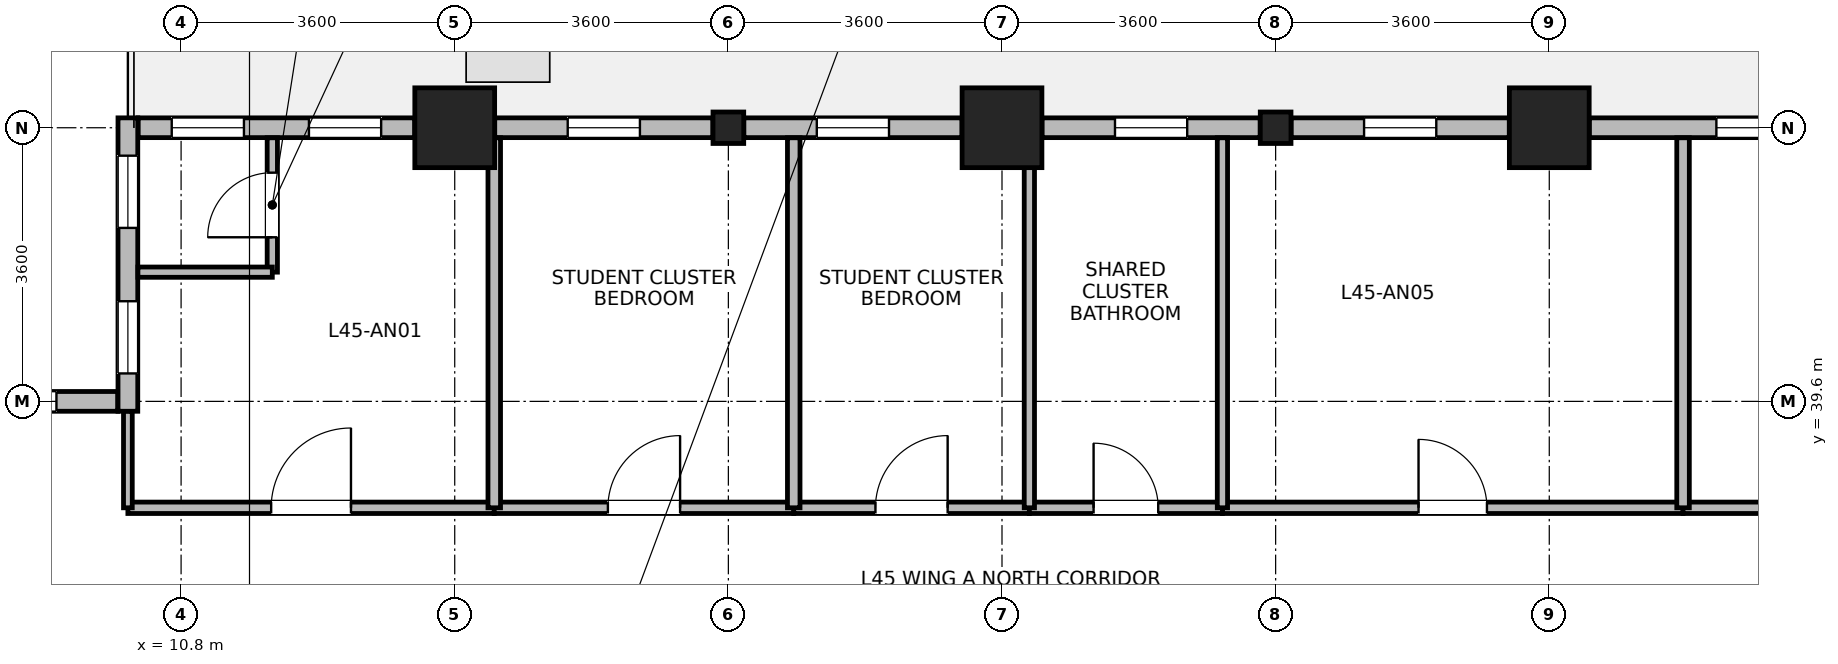
"""IFC4 building model, lengths in metres.
Left out: names, types, materials, properties, quantities, classifications, styles, units other than length and angle.
Written with IfcOpenShell. Run it as: python <this file> out.ifc"""

import sys

from ifc_helpers import new_model, si_unit, direction, frame, frame_2d, origin, origin_2d, place, context, subcontext, project, spatial, rectangle, i_section, extrude, source, transform, mapped, element, fill, save


model = new_model("IFC4")
c1 = context("Model", 3, precision=1e-05, world=origin(), true_north=direction((0.0, 1.0)))
c2 = subcontext(c1, "Body", "Model", "MODEL_VIEW")
j1 = project(units=[si_unit("LENGTHUNIT", "METRE"), si_unit("PLANEANGLEUNIT", "RADIAN")], contexts=[c1])
p1 = place(None, origin())
s1 = spatial("IfcSite", under=j1, at=p1, CompositionType="ELEMENT")
p2 = place(p1, origin())
s2 = spatial("IfcBuilding", under=s1, at=p2, CompositionType="ELEMENT")
p3 = place(p2, frame((0.0, 0.0, 177.2)))
s3 = spatial("IfcBuildingStorey", under=s2, at=p3, CompositionType="ELEMENT", Elevation=177.2)
m1 = source(origin(), c2, "Body", "SweptSolid", [
    extrude(rectangle(XDim=1.05, YDim=1.05, at=origin_2d()), origin(), (0.0, 0.0, 1.0), 3.7),
])
for number, where, z_axis, x_axis in (
    (1, (14.4, 43.2, 0.0), (0.0, 0.0, 1.0), (1.0, 0.0, 0.0)),
    (2, (21.6, 43.2, 0.0), (0.0, 0.0, 1.0), (1.0, 0.0, 0.0)),
    (3, (28.8, 43.2, 0.0), (0.0, 0.0, 1.0), (1.0, 0.0, 0.0)),
):
    element("IfcColumn", number, at=place(p3, frame(where, z_axis=z_axis, x_axis=x_axis)), inside=s3, PredefinedType="COLUMN", context=c2, shape_type="MappedRepresentation", body=[
        mapped(m1, transform((0.0, 0.0, 0.0), x_axis=(1.0, 0.0, 0.0), y_axis=(0.0, 1.0, 0.0), z_axis=(0.0, 0.0, 1.0), scale=1.0)),
    ])
m2 = source(origin(), c2, "Body", "SweptSolid", [
    extrude(i_section(OverallWidth=0.404, OverallDepth=0.414, WebThickness=0.021, FlangeThickness=0.028, FilletRadius=0.015, at=origin_2d()), origin(), (0.0, 0.0, 1.0), 3.7),
])
for number, where, z_axis, x_axis in (
    (4, (18.0, 43.2, 0.0), (0.0, 0.0, 1.0), (1.0, 0.0, 0.0)),
    (5, (25.2, 43.2, 0.0), (0.0, 0.0, 1.0), (1.0, 0.0, 0.0)),
):
    element("IfcColumn", number, at=place(p3, frame(where, z_axis=z_axis, x_axis=x_axis)), inside=s3, PredefinedType="COLUMN", context=c2, shape_type="MappedRepresentation", body=[
        mapped(m2, transform((0.0, 0.0, 0.0), x_axis=(1.0, 0.0, 0.0), y_axis=(0.0, 1.0, 0.0), z_axis=(0.0, 0.0, 1.0), scale=1.0)),
    ])
p4 = place(p3, frame((29.326, 43.2, 0.0), z_axis=(0.0, 0.0, 1.0), x_axis=(1.0, 0.0, 0.0)))
e6 = element("IfcWall", 6, at=p4, inside=s3, PredefinedType="STANDARD", context=c2, shape_type="SweptSolid", body=[
    extrude(rectangle(XDim=2.871, YDim=0.26, at=frame_2d((1.436, 0.0))), origin(), (0.0, 0.0, 1.0), 2.99),
])
p5 = place(p4, frame((1.673, 0.0, 0.85)))
e7 = element("IfcOpeningElement", 7, at=p5, cuts=e6, PredefinedType="OPENING", context=c2, shape_type="SweptSolid", body=[
    extrude(rectangle(XDim=0.95, YDim=1.75, at=frame_2d((0.475, 0.875))), frame((0.0, 0.14, 0.0), z_axis=(0.0, -1.0, 0.0), x_axis=(1.0, 0.0, 0.0)), (0.0, 0.0, 1.0), 0.28),
])
p6 = place(p3, frame((25.403, 43.2, 0.0), z_axis=(0.0, 0.0, 1.0), x_axis=(1.0, 0.0, 0.0)))
e8 = element("IfcWall", 8, at=p6, inside=s3, PredefinedType="STANDARD", context=c2, shape_type="SweptSolid", body=[
    extrude(rectangle(XDim=2.871, YDim=0.26, at=frame_2d((1.436, 0.0))), origin(), (0.0, 0.0, 1.0), 2.99),
])
p7 = place(p6, frame((0.96, 0.0, 0.85)))
e9 = element("IfcOpeningElement", 9, at=p7, cuts=e8, PredefinedType="OPENING", context=c2, shape_type="SweptSolid", body=[
    extrude(rectangle(XDim=0.95, YDim=1.75, at=frame_2d((0.475, 0.875))), frame((0.0, 0.14, 0.0), z_axis=(0.0, -1.0, 0.0), x_axis=(1.0, 0.0, 0.0)), (0.0, 0.0, 1.0), 0.28),
])
p8 = place(p3, frame((22.126, 43.2, 0.0), z_axis=(0.0, 0.0, 1.0), x_axis=(1.0, 0.0, 0.0)))
e10 = element("IfcWall", 10, at=p8, inside=s3, PredefinedType="STANDARD", context=c2, shape_type="SweptSolid", body=[
    extrude(rectangle(XDim=2.871, YDim=0.26, at=frame_2d((1.436, 0.0))), origin(), (0.0, 0.0, 1.0), 2.99),
])
p9 = place(p8, frame((0.96, 0.0, 0.85)))
e11 = element("IfcOpeningElement", 11, at=p9, cuts=e10, PredefinedType="OPENING", context=c2, shape_type="SweptSolid", body=[
    extrude(rectangle(XDim=0.95, YDim=1.75, at=frame_2d((0.475, 0.875))), frame((0.0, 0.14, 0.0), z_axis=(0.0, -1.0, 0.0), x_axis=(1.0, 0.0, 0.0)), (0.0, 0.0, 1.0), 0.28),
])
p10 = place(p3, frame((18.203, 43.2, 0.0), z_axis=(0.0, 0.0, 1.0), x_axis=(1.0, 0.0, 0.0)))
e12 = element("IfcWall", 12, at=p10, inside=s3, PredefinedType="STANDARD", context=c2, shape_type="SweptSolid", body=[
    extrude(rectangle(XDim=2.871, YDim=0.26, at=frame_2d((1.436, 0.0))), origin(), (0.0, 0.0, 1.0), 2.99),
])
p11 = place(p10, frame((0.96, 0.0, 0.85)))
e13 = element("IfcOpeningElement", 13, at=p11, cuts=e12, PredefinedType="OPENING", context=c2, shape_type="SweptSolid", body=[
    extrude(rectangle(XDim=0.95, YDim=1.75, at=frame_2d((0.475, 0.875))), frame((0.0, 0.14, 0.0), z_axis=(0.0, -1.0, 0.0), x_axis=(1.0, 0.0, 0.0)), (0.0, 0.0, 1.0), 0.28),
])
p12 = place(p3, frame((14.926, 43.2, 0.0), z_axis=(0.0, 0.0, 1.0), x_axis=(1.0, 0.0, 0.0)))
e14 = element("IfcWall", 14, at=p12, inside=s3, PredefinedType="STANDARD", context=c2, shape_type="SweptSolid", body=[
    extrude(rectangle(XDim=2.871, YDim=0.26, at=frame_2d((1.436, 0.0))), origin(), (0.0, 0.0, 1.0), 2.99),
])
p13 = place(p12, frame((0.96, 0.0, 0.85)))
e15 = element("IfcOpeningElement", 15, at=p13, cuts=e14, PredefinedType="OPENING", context=c2, shape_type="SweptSolid", body=[
    extrude(rectangle(XDim=0.95, YDim=1.75, at=frame_2d((0.475, 0.875))), frame((0.0, 0.14, 0.0), z_axis=(0.0, -1.0, 0.0), x_axis=(1.0, 0.0, 0.0)), (0.0, 0.0, 1.0), 0.28),
])
p14 = place(p3, frame((10.235, 43.2, 0.0), z_axis=(0.0, 0.0, 1.0), x_axis=(1.0, 0.0, 0.0)))
e16 = element("IfcWall", 16, at=p14, inside=s3, PredefinedType="STANDARD", context=c2, shape_type="SweptSolid", body=[
    extrude(rectangle(XDim=3.639, YDim=0.26, at=frame_2d((1.819, 0.0))), origin(), (0.0, 0.0, 1.0), 3.44),
])
p15 = place(p14, frame((0.442, 0.0, 0.85)))
e17 = element("IfcOpeningElement", 17, at=p15, cuts=e16, PredefinedType="OPENING", context=c2, shape_type="SweptSolid", body=[
    extrude(rectangle(XDim=0.95, YDim=1.75, at=frame_2d((0.475, 0.875))), frame((0.0, 0.14, 0.0), z_axis=(0.0, -1.0, 0.0), x_axis=(1.0, 0.0, 0.0)), (0.0, 0.0, 1.0), 0.28),
])
p16 = place(p14, frame((2.247, 0.0, 0.85)))
e18 = element("IfcOpeningElement", 18, at=p16, cuts=e16, PredefinedType="OPENING", context=c2, shape_type="SweptSolid", body=[
    extrude(rectangle(XDim=0.95, YDim=1.75, at=frame_2d((0.475, 0.875))), frame((0.0, 0.14, 0.0), z_axis=(0.0, -1.0, 0.0), x_axis=(1.0, 0.0, 0.0)), (0.0, 0.0, 1.0), 0.28),
])
p17 = place(p3, frame((10.1, 39.47, 0.0), z_axis=(0.0, 0.0, 1.0), x_axis=(0.0, 1.0, 0.0)))
e19 = element("IfcWall", 19, at=p17, inside=s3, PredefinedType="STANDARD", context=c2, shape_type="SweptSolid", body=[
    extrude(rectangle(XDim=3.86, YDim=0.26, at=frame_2d((1.93, 0.0))), origin(), (0.0, 0.0, 1.0), 3.44),
])
p18 = place(p17, frame((0.498, 0.0, 0.85)))
e20 = element("IfcOpeningElement", 20, at=p18, cuts=e19, PredefinedType="OPENING", context=c2, shape_type="SweptSolid", body=[
    extrude(rectangle(XDim=0.95, YDim=1.75, at=frame_2d((0.475, 0.875))), frame((0.0, 0.14, 0.0), z_axis=(0.0, -1.0, 0.0), x_axis=(1.0, 0.0, 0.0)), (0.0, 0.0, 1.0), 0.28),
])
p19 = place(p17, frame((2.412, 0.0, 0.85)))
e21 = element("IfcOpeningElement", 21, at=p19, cuts=e19, PredefinedType="OPENING", context=c2, shape_type="SweptSolid", body=[
    extrude(rectangle(XDim=0.95, YDim=1.75, at=frame_2d((0.475, 0.875))), frame((0.0, 0.14, 0.0), z_axis=(0.0, -1.0, 0.0), x_axis=(1.0, 0.0, 0.0)), (0.0, 0.0, 1.0), 0.28),
])
p20 = place(p3, frame((0.635, 39.6, 0.0), z_axis=(0.0, 0.0, 1.0), x_axis=(1.0, 0.0, 0.0)))
e22 = element("IfcWall", 22, at=p20, inside=s3, PredefinedType="STANDARD", context=c2, shape_type="SweptSolid", body=[
    extrude(rectangle(XDim=9.33, YDim=0.26, at=frame_2d((4.665, 0.0))), origin(), (0.0, 0.0, 1.0), 3.44),
])
p21 = place(p20, frame((0.805, 0.0, 0.85)))
e23 = element("IfcOpeningElement", 23, at=p21, cuts=e22, PredefinedType="OPENING", context=c2, shape_type="SweptSolid", body=[
    extrude(rectangle(XDim=1.5, YDim=1.85, at=frame_2d((0.75, 0.925))), frame((0.0, 0.14, 0.0), z_axis=(0.0, -1.0, 0.0), x_axis=(1.0, 0.0, 0.0)), (0.0, 0.0, 1.0), 0.28),
])
p22 = place(p20, frame((3.915, 0.0, 0.85)))
e24 = element("IfcOpeningElement", 24, at=p22, cuts=e22, PredefinedType="OPENING", context=c2, shape_type="SweptSolid", body=[
    extrude(rectangle(XDim=1.5, YDim=1.85, at=frame_2d((0.75, 0.925))), frame((0.0, 0.14, 0.0), z_axis=(0.0, -1.0, 0.0), x_axis=(1.0, 0.0, 0.0)), (0.0, 0.0, 1.0), 0.28),
])
p23 = place(p20, frame((7.025, 0.0, 0.85)))
e25 = element("IfcOpeningElement", 25, at=p23, cuts=e22, PredefinedType="OPENING", context=c2, shape_type="SweptSolid", body=[
    extrude(rectangle(XDim=1.5, YDim=1.85, at=frame_2d((0.75, 0.925))), frame((0.0, 0.14, 0.0), z_axis=(0.0, -1.0, 0.0), x_axis=(1.0, 0.0, 0.0)), (0.0, 0.0, 1.0), 0.28),
])
p24 = place(p3, frame((12.0, 41.3, 0.0), z_axis=(0.0, 0.0, 1.0), x_axis=(0.0, 1.0, 0.0)))
e26 = element("IfcWall", 26, at=p24, inside=s3, PredefinedType="PARTITIONING", context=c2, shape_type="SweptSolid", body=[
    extrude(rectangle(XDim=1.768, YDim=0.135, at=frame_2d((0.884, 0.0))), origin(), (0.0, 0.0, 1.0), 3.44),
])
p25 = place(p24, frame((0.459, 0.0, 0.0)))
e27 = element("IfcOpeningElement", 27, at=p25, cuts=e26, PredefinedType="OPENING", context=c2, shape_type="SweptSolid", body=[
    extrude(rectangle(XDim=0.85, YDim=2.04, at=frame_2d((0.425, 1.02))), frame((0.0, 0.078, 0.0), z_axis=(0.0, -1.0, 0.0), x_axis=(1.0, 0.0, 0.0)), (0.0, 0.0, 1.0), 0.155),
])
p26 = place(p3, frame((10.232, 41.3, 0.0), z_axis=(0.0, 0.0, 1.0), x_axis=(1.0, 0.0, 0.0)))
e28 = element("IfcWall", 28, at=p26, inside=s3, PredefinedType="PARTITIONING", context=c2, shape_type="SweptSolid", body=[
    extrude(rectangle(XDim=1.768, YDim=0.135, at=frame_2d((0.884, 0.0))), origin(), (0.0, 0.0, 1.0), 3.44),
])
p27 = place(p3, frame((24.5, 38.2, 0.0), z_axis=(0.0, 0.0, 1.0), x_axis=(1.0, 0.0, 0.0)))
e29 = element("IfcWall", 29, at=p27, inside=s3, PredefinedType="PARTITIONING", context=c2, shape_type="SweptSolid", body=[
    extrude(rectangle(XDim=6.06, YDim=0.15, at=frame_2d((3.03, 0.0))), origin(), (0.0, 0.0, 1.0), 3.44),
])
p28 = place(p27, frame((2.58, 0.0, 0.0)))
e30 = element("IfcOpeningElement", 30, at=p28, cuts=e29, PredefinedType="OPENING", context=c2, shape_type="SweptSolid", body=[
    extrude(rectangle(XDim=0.9, YDim=2.08, at=frame_2d((0.45, 1.04))), frame((0.0, 0.085, 0.0), z_axis=(0.0, -1.0, 0.0), x_axis=(1.0, 0.0, 0.0)), (0.0, 0.0, 1.0), 0.17),
])
p29 = place(p3, frame((10.1, 38.2, 0.0), z_axis=(0.0, 0.0, 1.0), x_axis=(1.0, 0.0, 0.0)))
e31 = element("IfcWall", 31, at=p29, inside=s3, PredefinedType="PARTITIONING", context=c2, shape_type="SweptSolid", body=[
    extrude(rectangle(XDim=4.82, YDim=0.15, at=frame_2d((2.41, 0.0))), origin(), (0.0, 0.0, 1.0), 3.44),
])
p30 = place(p29, frame((1.885, 0.0, 0.0)))
e32 = element("IfcOpeningElement", 32, at=p30, cuts=e31, PredefinedType="OPENING", context=c2, shape_type="SweptSolid", body=[
    extrude(rectangle(XDim=1.05, YDim=2.12, at=frame_2d((0.525, 1.06))), frame((0.0, 0.085, 0.0), z_axis=(0.0, -1.0, 0.0), x_axis=(1.0, 0.0, 0.0)), (0.0, 0.0, 1.0), 0.17),
])
p31 = place(p3, frame((30.56, 38.2, 0.0), z_axis=(0.0, 0.0, 1.0), x_axis=(1.0, 0.0, 0.0)))
e33 = element("IfcWall", 33, at=p31, inside=s3, PredefinedType="PARTITIONING", context=c2, shape_type="SweptSolid", body=[
    extrude(rectangle(XDim=4.8, YDim=0.15, at=frame_2d((2.4, 0.0))), origin(), (0.0, 0.0, 1.0), 3.44),
])
p32 = place(p31, frame((1.75, 0.0, 0.0)))
e34 = element("IfcOpeningElement", 34, at=p32, cuts=e33, PredefinedType="OPENING", context=c2, shape_type="SweptSolid", body=[
    extrude(rectangle(XDim=1.3, YDim=2.12, at=frame_2d((0.65, 1.06))), frame((0.0, 0.085, 0.0), z_axis=(0.0, -1.0, 0.0), x_axis=(1.0, 0.0, 0.0)), (0.0, 0.0, 1.0), 0.17),
])
p33 = place(p3, frame((14.92, 38.2, 0.0), z_axis=(0.0, 0.0, 1.0), x_axis=(1.0, 0.0, 0.0)))
e35 = element("IfcWall", 35, at=p33, inside=s3, PredefinedType="PARTITIONING", context=c2, shape_type="SweptSolid", body=[
    extrude(rectangle(XDim=3.94, YDim=0.15, at=frame_2d((1.97, 0.0))), origin(), (0.0, 0.0, 1.0), 3.44),
])
p34 = place(p33, frame((1.495, 0.0, 0.0)))
e36 = element("IfcOpeningElement", 36, at=p34, cuts=e35, PredefinedType="OPENING", context=c2, shape_type="SweptSolid", body=[
    extrude(rectangle(XDim=0.95, YDim=2.1, at=frame_2d((0.475, 1.05))), frame((0.0, 0.085, 0.0), z_axis=(0.0, -1.0, 0.0), x_axis=(1.0, 0.0, 0.0)), (0.0, 0.0, 1.0), 0.17),
])
p35 = place(p3, frame((18.86, 38.2, 0.0), z_axis=(0.0, 0.0, 1.0), x_axis=(1.0, 0.0, 0.0)))
e37 = element("IfcWall", 37, at=p35, inside=s3, PredefinedType="PARTITIONING", context=c2, shape_type="SweptSolid", body=[
    extrude(rectangle(XDim=3.1, YDim=0.15, at=frame_2d((1.55, 0.0))), origin(), (0.0, 0.0, 1.0), 3.44),
])
p36 = place(p35, frame((1.075, 0.0, 0.0)))
e38 = element("IfcOpeningElement", 38, at=p36, cuts=e37, PredefinedType="OPENING", context=c2, shape_type="SweptSolid", body=[
    extrude(rectangle(XDim=0.95, YDim=2.1, at=frame_2d((0.475, 1.05))), frame((0.0, 0.085, 0.0), z_axis=(0.0, -1.0, 0.0), x_axis=(1.0, 0.0, 0.0)), (0.0, 0.0, 1.0), 0.17),
])
p37 = place(p3, frame((21.96, 38.2, 0.0), z_axis=(0.0, 0.0, 1.0), x_axis=(1.0, 0.0, 0.0)))
e39 = element("IfcWall", 39, at=p37, inside=s3, PredefinedType="PARTITIONING", context=c2, shape_type="SweptSolid", body=[
    extrude(rectangle(XDim=2.54, YDim=0.15, at=frame_2d((1.27, 0.0))), origin(), (0.0, 0.0, 1.0), 3.44),
])
p38 = place(p37, frame((0.845, 0.0, 0.0)))
e40 = element("IfcOpeningElement", 40, at=p38, cuts=e39, PredefinedType="OPENING", context=c2, shape_type="SweptSolid", body=[
    extrude(rectangle(XDim=0.85, YDim=2.04, at=frame_2d((0.425, 1.02))), frame((0.0, 0.085, 0.0), z_axis=(0.0, -1.0, 0.0), x_axis=(1.0, 0.0, 0.0)), (0.0, 0.0, 1.0), 0.17),
])
for number, where, z_axis, x_axis in (
    (41, (14.92, 38.2, 0.0), (0.0, 0.0, 1.0), (0.0, 1.0, 0.0)),
    (42, (18.86, 38.2, 0.0), (0.0, 0.0, 1.0), (0.0, 1.0, 0.0)),
):
    element("IfcWall", number, at=place(p3, frame(where, z_axis=z_axis, x_axis=x_axis)), inside=s3, PredefinedType="PARTITIONING", context=c2, shape_type="SweptSolid", body=[
        extrude(rectangle(XDim=4.868, YDim=0.165, at=frame_2d((2.434, 0.0))), origin(), (0.0, 0.0, 1.0), 3.44),
    ])
for number, where, z_axis, x_axis in (
    (43, (21.96, 38.2, 0.0), (0.0, 0.0, 1.0), (0.0, 1.0, 0.0)),
    (44, (24.5, 38.2, 0.0), (0.0, 0.0, 1.0), (0.0, 1.0, 0.0)),
):
    element("IfcWall", number, at=place(p3, frame(where, z_axis=z_axis, x_axis=x_axis)), inside=s3, PredefinedType="PARTITIONING", context=c2, shape_type="SweptSolid", body=[
        extrude(rectangle(XDim=4.868, YDim=0.135, at=frame_2d((2.434, 0.0))), origin(), (0.0, 0.0, 1.0), 3.44),
    ])
p39 = place(p3, frame((30.56, 38.2, 0.0), z_axis=(0.0, 0.0, 1.0), x_axis=(0.0, 1.0, 0.0)))
e45 = element("IfcWall", 45, at=p39, inside=s3, PredefinedType="PARTITIONING", context=c2, shape_type="SweptSolid", body=[
    extrude(rectangle(XDim=4.868, YDim=0.165, at=frame_2d((2.434, 0.0))), origin(), (0.0, 0.0, 1.0), 3.44),
])
p40 = place(p3, frame((10.1, 38.2, 0.0), z_axis=(0.0, 0.0, 1.0), x_axis=(0.0, 1.0, 0.0)))
e46 = element("IfcWall", 46, at=p40, inside=s3, PredefinedType="PARTITIONING", context=c2, shape_type="SweptSolid", body=[
    extrude(rectangle(XDim=1.268, YDim=0.115, at=frame_2d((0.634, 0.0))), origin(), (0.0, 0.0, 1.0), 3.44),
])
p41 = place(p5, origin())
e47 = element("IfcWindow", 47, at=p41, inside=s3, PartitioningType="SINGLE_PANEL", PredefinedType="WINDOW", context=c2, shape_type="SweptSolid", body=[
    extrude(rectangle(XDim=0.95, YDim=1.75, at=frame_2d((0.475, 0.875))), frame((0.0, 0.03, 0.0), z_axis=(0.0, -1.0, 0.0), x_axis=(1.0, 0.0, 0.0)), (0.0, 0.0, 1.0), 0.06),
])
fill(e7, e47)
p42 = place(p7, origin())
e48 = element("IfcWindow", 48, at=p42, inside=s3, PartitioningType="SINGLE_PANEL", PredefinedType="WINDOW", context=c2, shape_type="SweptSolid", body=[
    extrude(rectangle(XDim=0.95, YDim=1.75, at=frame_2d((0.475, 0.875))), frame((0.0, 0.03, 0.0), z_axis=(0.0, -1.0, 0.0), x_axis=(1.0, 0.0, 0.0)), (0.0, 0.0, 1.0), 0.06),
])
fill(e9, e48)
p43 = place(p9, origin())
e49 = element("IfcWindow", 49, at=p43, inside=s3, PartitioningType="SINGLE_PANEL", PredefinedType="WINDOW", context=c2, shape_type="SweptSolid", body=[
    extrude(rectangle(XDim=0.95, YDim=1.75, at=frame_2d((0.475, 0.875))), frame((0.0, 0.03, 0.0), z_axis=(0.0, -1.0, 0.0), x_axis=(1.0, 0.0, 0.0)), (0.0, 0.0, 1.0), 0.06),
])
fill(e11, e49)
p44 = place(p11, origin())
e50 = element("IfcWindow", 50, at=p44, inside=s3, PartitioningType="SINGLE_PANEL", PredefinedType="WINDOW", context=c2, shape_type="SweptSolid", body=[
    extrude(rectangle(XDim=0.95, YDim=1.75, at=frame_2d((0.475, 0.875))), frame((0.0, 0.03, 0.0), z_axis=(0.0, -1.0, 0.0), x_axis=(1.0, 0.0, 0.0)), (0.0, 0.0, 1.0), 0.06),
])
fill(e13, e50)
p45 = place(p13, origin())
e51 = element("IfcWindow", 51, at=p45, inside=s3, PartitioningType="SINGLE_PANEL", PredefinedType="WINDOW", context=c2, shape_type="SweptSolid", body=[
    extrude(rectangle(XDim=0.95, YDim=1.75, at=frame_2d((0.475, 0.875))), frame((0.0, 0.03, 0.0), z_axis=(0.0, -1.0, 0.0), x_axis=(1.0, 0.0, 0.0)), (0.0, 0.0, 1.0), 0.06),
])
fill(e15, e51)
p46 = place(p15, origin())
e52 = element("IfcWindow", 52, at=p46, inside=s3, PartitioningType="SINGLE_PANEL", PredefinedType="WINDOW", context=c2, shape_type="SweptSolid", body=[
    extrude(rectangle(XDim=0.95, YDim=1.75, at=frame_2d((0.475, 0.875))), frame((0.0, 0.03, 0.0), z_axis=(0.0, -1.0, 0.0), x_axis=(1.0, 0.0, 0.0)), (0.0, 0.0, 1.0), 0.06),
])
fill(e17, e52)
p47 = place(p16, origin())
e53 = element("IfcWindow", 53, at=p47, inside=s3, PartitioningType="SINGLE_PANEL", PredefinedType="WINDOW", context=c2, shape_type="SweptSolid", body=[
    extrude(rectangle(XDim=0.95, YDim=1.75, at=frame_2d((0.475, 0.875))), frame((0.0, 0.03, 0.0), z_axis=(0.0, -1.0, 0.0), x_axis=(1.0, 0.0, 0.0)), (0.0, 0.0, 1.0), 0.06),
])
fill(e18, e53)
p48 = place(p18, origin())
e54 = element("IfcWindow", 54, at=p48, inside=s3, PartitioningType="SINGLE_PANEL", PredefinedType="WINDOW", context=c2, shape_type="SweptSolid", body=[
    extrude(rectangle(XDim=0.95, YDim=1.75, at=frame_2d((0.475, 0.875))), frame((0.0, 0.03, 0.0), z_axis=(0.0, -1.0, 0.0), x_axis=(1.0, 0.0, 0.0)), (0.0, 0.0, 1.0), 0.06),
])
fill(e20, e54)
p49 = place(p19, origin())
e55 = element("IfcWindow", 55, at=p49, inside=s3, PartitioningType="SINGLE_PANEL", PredefinedType="WINDOW", context=c2, shape_type="SweptSolid", body=[
    extrude(rectangle(XDim=0.95, YDim=1.75, at=frame_2d((0.475, 0.875))), frame((0.0, 0.03, 0.0), z_axis=(0.0, -1.0, 0.0), x_axis=(1.0, 0.0, 0.0)), (0.0, 0.0, 1.0), 0.06),
])
fill(e21, e55)
p50 = place(p23, origin())
e56 = element("IfcWindow", 56, at=p50, inside=s3, PartitioningType="SINGLE_PANEL", PredefinedType="WINDOW", context=c2, shape_type="SweptSolid", body=[
    extrude(rectangle(XDim=1.5, YDim=1.85, at=frame_2d((0.75, 0.925))), frame((0.0, 0.03, 0.0), z_axis=(0.0, -1.0, 0.0), x_axis=(1.0, 0.0, 0.0)), (0.0, 0.0, 1.0), 0.06),
])
fill(e25, e56)
p51 = place(p25, origin())
e57 = element("IfcDoor", 57, at=p51, inside=s3, OperationType="SINGLE_SWING_LEFT", PredefinedType="DOOR", context=c2, shape_type="SweptSolid", body=[
    extrude(rectangle(XDim=0.85, YDim=2.04, at=frame_2d((0.425, 1.02))), frame((0.0, 0.025, 0.0), z_axis=(0.0, -1.0, 0.0), x_axis=(1.0, 0.0, 0.0)), (0.0, 0.0, 1.0), 0.05),
])
fill(e27, e57)
p52 = place(p28, origin())
e58 = element("IfcDoor", 58, at=p52, inside=s3, OperationType="SINGLE_SWING_LEFT", PredefinedType="DOOR", context=c2, shape_type="SweptSolid", body=[
    extrude(rectangle(XDim=0.9, YDim=2.08, at=frame_2d((0.45, 1.04))), frame((0.0, 0.025, 0.0), z_axis=(0.0, -1.0, 0.0), x_axis=(1.0, 0.0, 0.0)), (0.0, 0.0, 1.0), 0.05),
])
fill(e30, e58)
p53 = place(p30, origin())
e59 = element("IfcDoor", 59, at=p53, inside=s3, OperationType="SINGLE_SWING_RIGHT", PredefinedType="DOOR", context=c2, shape_type="SweptSolid", body=[
    extrude(rectangle(XDim=1.05, YDim=2.12, at=frame_2d((0.525, 1.06))), frame((0.0, 0.025, 0.0), z_axis=(0.0, -1.0, 0.0), x_axis=(1.0, 0.0, 0.0)), (0.0, 0.0, 1.0), 0.05),
])
fill(e32, e59)
p54 = place(p34, origin())
e60 = element("IfcDoor", 60, at=p54, inside=s3, OperationType="SINGLE_SWING_RIGHT", PredefinedType="DOOR", context=c2, shape_type="SweptSolid", body=[
    extrude(rectangle(XDim=0.95, YDim=2.1, at=frame_2d((0.475, 1.05))), frame((0.0, 0.025, 0.0), z_axis=(0.0, -1.0, 0.0), x_axis=(1.0, 0.0, 0.0)), (0.0, 0.0, 1.0), 0.05),
])
fill(e36, e60)
p55 = place(p36, origin())
e61 = element("IfcDoor", 61, at=p55, inside=s3, OperationType="SINGLE_SWING_RIGHT", PredefinedType="DOOR", context=c2, shape_type="SweptSolid", body=[
    extrude(rectangle(XDim=0.95, YDim=2.1, at=frame_2d((0.475, 1.05))), frame((0.0, 0.025, 0.0), z_axis=(0.0, -1.0, 0.0), x_axis=(1.0, 0.0, 0.0)), (0.0, 0.0, 1.0), 0.05),
])
fill(e38, e61)
p56 = place(p38, origin())
e62 = element("IfcDoor", 62, at=p56, inside=s3, OperationType="SINGLE_SWING_LEFT", PredefinedType="DOOR", context=c2, shape_type="SweptSolid", body=[
    extrude(rectangle(XDim=0.85, YDim=2.04, at=frame_2d((0.425, 1.02))), frame((0.0, 0.025, 0.0), z_axis=(0.0, -1.0, 0.0), x_axis=(1.0, 0.0, 0.0)), (0.0, 0.0, 1.0), 0.05),
])
fill(e40, e62)
save(model, sys.argv[1])
